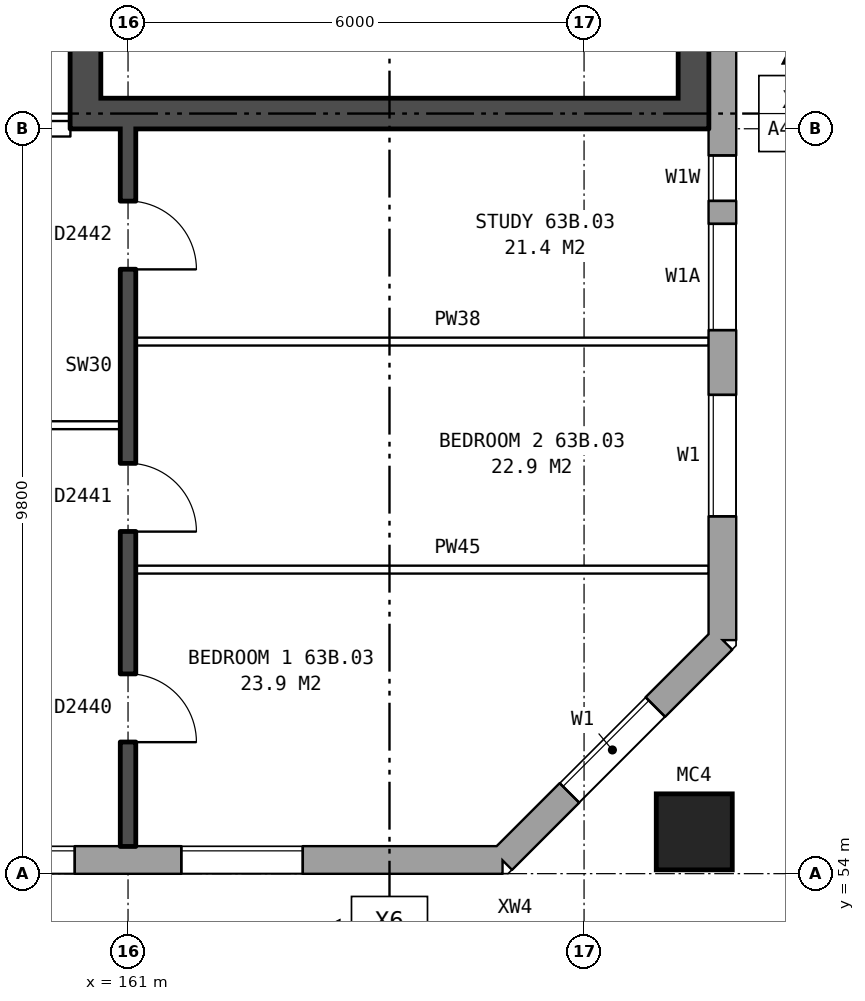
"""IFC4 building model, lengths in metres.
Left out: names, types, materials, properties, quantities, classifications, styles, units other than length and angle.
Written with IfcOpenShell. Run it as: python <this file> out.ifc"""

import sys

from ifc_helpers import new_model, si_unit, direction, frame, frame_2d, origin, origin_2d, place, context, subcontext, project, spatial, rectangle, hollow_rectangle, extrude, element, fill, save


model = new_model("IFC4")
c1 = context("Model", 3, precision=1e-05, world=origin(), true_north=direction((0.0, 1.0)))
c2 = subcontext(c1, "Body", "Model", "MODEL_VIEW")
j1 = project(units=[si_unit("LENGTHUNIT", "METRE"), si_unit("PLANEANGLEUNIT", "RADIAN")], contexts=[c1])
p1 = place(None, origin())
s1 = spatial("IfcSite", under=j1, at=p1, CompositionType="ELEMENT")
p2 = place(p1, origin())
s2 = spatial("IfcBuilding", under=s1, at=p2, CompositionType="ELEMENT")
p3 = place(p2, frame((0.0, 0.0, 224.5)))
s3 = spatial("IfcBuildingStorey", under=s2, at=p3, CompositionType="ELEMENT", Elevation=224.5)
p4 = place(p3, frame((168.45, 54.55, 0.0), z_axis=(0.0, 0.0, 1.0), x_axis=(1.0, 0.0, 0.0)))
e1 = element("IfcColumn", 1, at=p4, inside=s3, PredefinedType="COLUMN", context=c2, shape_type="SweptSolid", body=[
    extrude(hollow_rectangle(XDim=1.0, YDim=1.0, WallThickness=0.055, at=origin_2d()), origin(), (0.0, 0.0, 1.0), 3.1),
])
p5 = place(p3, frame((132.05, 54.18, 0.0), z_axis=(0.0, 0.0, 1.0), x_axis=(1.0, 0.0, 0.0)))
e2 = element("IfcWall", 2, at=p5, inside=s3, PredefinedType="STANDARD", context=c2, shape_type="SweptSolid", body=[
    extrude(rectangle(XDim=33.875, YDim=0.36, at=frame_2d((16.938, 0.0))), origin(), (0.0, 0.0, 1.0), 2.85),
])
p6 = place(p5, frame((2.65, 0.0, 0.8)))
e3 = element("IfcOpeningElement", 3, at=p6, cuts=e2, PredefinedType="OPENING", context=c2, shape_type="SweptSolid", body=[
    extrude(rectangle(XDim=1.6, YDim=1.8, at=frame_2d((0.8, 0.9))), frame((0.0, 0.19, 0.0), z_axis=(0.0, -1.0, 0.0), x_axis=(1.0, 0.0, 0.0)), (0.0, 0.0, 1.0), 0.38),
])
p7 = place(p5, frame((5.65, 0.0, 0.8)))
e4 = element("IfcOpeningElement", 4, at=p7, cuts=e2, PredefinedType="OPENING", context=c2, shape_type="SweptSolid", body=[
    extrude(rectangle(XDim=1.6, YDim=1.8, at=frame_2d((0.8, 0.9))), frame((0.0, 0.19, 0.0), z_axis=(0.0, -1.0, 0.0), x_axis=(1.0, 0.0, 0.0)), (0.0, 0.0, 1.0), 0.38),
])
p8 = place(p5, frame((8.65, 0.0, 0.8)))
e5 = element("IfcOpeningElement", 5, at=p8, cuts=e2, PredefinedType="OPENING", context=c2, shape_type="SweptSolid", body=[
    extrude(rectangle(XDim=1.6, YDim=1.8, at=frame_2d((0.8, 0.9))), frame((0.0, 0.19, 0.0), z_axis=(0.0, -1.0, 0.0), x_axis=(1.0, 0.0, 0.0)), (0.0, 0.0, 1.0), 0.38),
])
p9 = place(p5, frame((11.15, 0.0, 1.7)))
e6 = element("IfcOpeningElement", 6, at=p9, cuts=e2, PredefinedType="OPENING", context=c2, shape_type="SweptSolid", body=[
    extrude(rectangle(XDim=0.6, YDim=0.9, at=frame_2d((0.3, 0.45))), frame((0.0, 0.19, 0.0), z_axis=(0.0, -1.0, 0.0), x_axis=(1.0, 0.0, 0.0)), (0.0, 0.0, 1.0), 0.38),
])
p10 = place(p5, frame((14.65, 0.0, 0.8)))
e7 = element("IfcOpeningElement", 7, at=p10, cuts=e2, PredefinedType="OPENING", context=c2, shape_type="SweptSolid", body=[
    extrude(rectangle(XDim=1.6, YDim=1.8, at=frame_2d((0.8, 0.9))), frame((0.0, 0.19, 0.0), z_axis=(0.0, -1.0, 0.0), x_axis=(1.0, 0.0, 0.0)), (0.0, 0.0, 1.0), 0.38),
])
p11 = place(p5, frame((17.65, 0.0, 0.8)))
e8 = element("IfcOpeningElement", 8, at=p11, cuts=e2, PredefinedType="OPENING", context=c2, shape_type="SweptSolid", body=[
    extrude(rectangle(XDim=1.6, YDim=1.8, at=frame_2d((0.8, 0.9))), frame((0.0, 0.19, 0.0), z_axis=(0.0, -1.0, 0.0), x_axis=(1.0, 0.0, 0.0)), (0.0, 0.0, 1.0), 0.38),
])
p12 = place(p5, frame((20.65, 0.0, 0.8)))
e9 = element("IfcOpeningElement", 9, at=p12, cuts=e2, PredefinedType="OPENING", context=c2, shape_type="SweptSolid", body=[
    extrude(rectangle(XDim=1.6, YDim=1.8, at=frame_2d((0.8, 0.9))), frame((0.0, 0.19, 0.0), z_axis=(0.0, -1.0, 0.0), x_axis=(1.0, 0.0, 0.0)), (0.0, 0.0, 1.0), 0.38),
])
p13 = place(p5, frame((24.65, 0.0, 0.8)))
e10 = element("IfcOpeningElement", 10, at=p13, cuts=e2, PredefinedType="OPENING", context=c2, shape_type="SweptSolid", body=[
    extrude(rectangle(XDim=1.6, YDim=1.8, at=frame_2d((0.8, 0.9))), frame((0.0, 0.19, 0.0), z_axis=(0.0, -1.0, 0.0), x_axis=(1.0, 0.0, 0.0)), (0.0, 0.0, 1.0), 0.38),
])
p14 = place(p5, frame((26.65, 0.0, 0.8)))
e11 = element("IfcOpeningElement", 11, at=p14, cuts=e2, PredefinedType="OPENING", context=c2, shape_type="SweptSolid", body=[
    extrude(rectangle(XDim=1.6, YDim=1.8, at=frame_2d((0.8, 0.9))), frame((0.0, 0.19, 0.0), z_axis=(0.0, -1.0, 0.0), x_axis=(1.0, 0.0, 0.0)), (0.0, 0.0, 1.0), 0.38),
])
p15 = place(p5, frame((29.65, 0.0, 0.8)))
e12 = element("IfcOpeningElement", 12, at=p15, cuts=e2, PredefinedType="OPENING", context=c2, shape_type="SweptSolid", body=[
    extrude(rectangle(XDim=1.6, YDim=1.8, at=frame_2d((0.8, 0.9))), frame((0.0, 0.19, 0.0), z_axis=(0.0, -1.0, 0.0), x_axis=(1.0, 0.0, 0.0)), (0.0, 0.0, 1.0), 0.38),
])
p16 = place(p5, frame((13.2, 0.0, 0.8)))
e13 = element("IfcOpeningElement", 13, at=p16, cuts=e2, PredefinedType="OPENING", context=c2, shape_type="SweptSolid", body=[
    extrude(rectangle(XDim=0.6, YDim=1.5, at=frame_2d((0.3, 0.75))), frame((0.0, 0.19, 0.0), z_axis=(0.0, -1.0, 0.0), x_axis=(1.0, 0.0, 0.0)), (0.0, 0.0, 1.0), 0.38),
])
p17 = place(p3, frame((165.925, 54.18, 0.0), z_axis=(0.0, 0.0, 1.0), x_axis=(0.707106781187, 0.707106781187, 0.0)))
e14 = element("IfcWall", 14, at=p17, inside=s3, PredefinedType="STANDARD", context=c2, shape_type="SweptSolid", body=[
    extrude(rectangle(XDim=4.094, YDim=0.36, at=frame_2d((2.047, 0.0))), origin(), (0.0, 0.0, 1.0), 2.85),
])
p18 = place(p17, frame((1.247, 0.0, 0.8)))
e15 = element("IfcOpeningElement", 15, at=p18, cuts=e14, PredefinedType="OPENING", context=c2, shape_type="SweptSolid", body=[
    extrude(rectangle(XDim=1.6, YDim=1.8, at=frame_2d((0.8, 0.9))), frame((0.0, 0.19, 0.0), z_axis=(0.0, -1.0, 0.0), x_axis=(1.0, 0.0, 0.0)), (0.0, 0.0, 1.0), 0.38),
])
p19 = place(p3, frame((168.82, 57.075, 0.0), z_axis=(0.0, 0.0, 1.0), x_axis=(0.0, 1.0, 0.0)))
e16 = element("IfcWall", 16, at=p19, inside=s3, PredefinedType="STANDARD", context=c2, shape_type="SweptSolid", body=[
    extrude(rectangle(XDim=25.851, YDim=0.36, at=frame_2d((12.925, 0.0))), origin(), (0.0, 0.0, 1.0), 2.85),
])
p20 = place(p19, frame((1.625, 0.0, 0.8)))
e17 = element("IfcOpeningElement", 17, at=p20, cuts=e16, PredefinedType="OPENING", context=c2, shape_type="SweptSolid", body=[
    extrude(rectangle(XDim=1.6, YDim=1.8, at=frame_2d((0.8, 0.9))), frame((0.0, 0.19, 0.0), z_axis=(0.0, -1.0, 0.0), x_axis=(1.0, 0.0, 0.0)), (0.0, 0.0, 1.0), 0.38),
])
p21 = place(p19, frame((4.075, 0.0, 0.8)))
e18 = element("IfcOpeningElement", 18, at=p21, cuts=e16, PredefinedType="OPENING", context=c2, shape_type="SweptSolid", body=[
    extrude(rectangle(XDim=1.4, YDim=1.8, at=frame_2d((0.7, 0.9))), frame((0.0, 0.19, 0.0), z_axis=(0.0, -1.0, 0.0), x_axis=(1.0, 0.0, 0.0)), (0.0, 0.0, 1.0), 0.38),
])
p22 = place(p19, frame((19.425, 0.0, 0.8)))
e19 = element("IfcOpeningElement", 19, at=p22, cuts=e16, PredefinedType="OPENING", context=c2, shape_type="SweptSolid", body=[
    extrude(rectangle(XDim=0.6, YDim=0.9, at=frame_2d((0.3, 0.45))), frame((0.0, 0.19, 0.0), z_axis=(0.0, -1.0, 0.0), x_axis=(1.0, 0.0, 0.0)), (0.0, 0.0, 1.0), 0.38),
])
p23 = place(p19, frame((22.625, 0.0, 0.8)))
e20 = element("IfcOpeningElement", 20, at=p23, cuts=e16, PredefinedType="OPENING", context=c2, shape_type="SweptSolid", body=[
    extrude(rectangle(XDim=1.6, YDim=1.8, at=frame_2d((0.8, 0.9))), frame((0.0, 0.19, 0.0), z_axis=(0.0, -1.0, 0.0), x_axis=(1.0, 0.0, 0.0)), (0.0, 0.0, 1.0), 0.38),
])
p24 = place(p19, frame((5.775, 0.0, 0.8)))
e21 = element("IfcOpeningElement", 21, at=p24, cuts=e16, PredefinedType="OPENING", context=c2, shape_type="SweptSolid", body=[
    extrude(rectangle(XDim=0.6, YDim=0.9, at=frame_2d((0.3, 0.45))), frame((0.0, 0.19, 0.0), z_axis=(0.0, -1.0, 0.0), x_axis=(1.0, 0.0, 0.0)), (0.0, 0.0, 1.0), 0.38),
])
p25 = place(p19, frame((20.325, 0.0, 0.8)))
e22 = element("IfcOpeningElement", 22, at=p25, cuts=e16, PredefinedType="OPENING", context=c2, shape_type="SweptSolid", body=[
    extrude(rectangle(XDim=1.4, YDim=1.8, at=frame_2d((0.7, 0.9))), frame((0.0, 0.19, 0.0), z_axis=(0.0, -1.0, 0.0), x_axis=(1.0, 0.0, 0.0)), (0.0, 0.0, 1.0), 0.38),
])
p26 = place(p3, frame((160.44, 76.2, 0.0), z_axis=(0.0, 0.0, 1.0), x_axis=(0.0, -1.0, 0.0)))
e23 = element("IfcWall", 23, at=p26, inside=s3, PredefinedType="SHEAR", context=c2, shape_type="SweptSolid", body=[
    extrude(rectangle(XDim=12.4, YDim=0.4, at=frame_2d((6.2, 0.0))), origin(), (0.0, 0.0, 1.0), 2.85),
])
p27 = place(p26, frame((1.325, 0.0, 0.0)))
e24 = element("IfcOpeningElement", 24, at=p27, cuts=e23, PredefinedType="OPENING", context=c2, shape_type="SweptSolid", body=[
    extrude(rectangle(XDim=1.1, YDim=2.1, at=frame_2d((0.55, 1.05))), frame((0.0, 0.21, 0.0), z_axis=(0.0, -1.0, 0.0), x_axis=(1.0, 0.0, 0.0)), (0.0, 0.0, 1.0), 0.42),
])
p28 = place(p26, frame((3.625, 0.0, 0.0)))
e25 = element("IfcOpeningElement", 25, at=p28, cuts=e23, PredefinedType="OPENING", context=c2, shape_type="SweptSolid", body=[
    extrude(rectangle(XDim=0.85, YDim=2.1, at=frame_2d((0.425, 1.05))), frame((0.0, 0.21, 0.0), z_axis=(0.0, -1.0, 0.0), x_axis=(1.0, 0.0, 0.0)), (0.0, 0.0, 1.0), 0.42),
])
p29 = place(p26, frame((5.775, 0.0, 0.0)))
e26 = element("IfcOpeningElement", 26, at=p29, cuts=e23, PredefinedType="OPENING", context=c2, shape_type="SweptSolid", body=[
    extrude(rectangle(XDim=0.85, YDim=2.1, at=frame_2d((0.425, 1.05))), frame((0.0, 0.21, 0.0), z_axis=(0.0, -1.0, 0.0), x_axis=(1.0, 0.0, 0.0)), (0.0, 0.0, 1.0), 0.42),
])
p30 = place(p26, frame((9.9, 0.0, 0.0)))
e27 = element("IfcOpeningElement", 27, at=p30, cuts=e23, PredefinedType="OPENING", context=c2, shape_type="SweptSolid", body=[
    extrude(rectangle(XDim=1.1, YDim=2.1, at=frame_2d((0.55, 1.05))), frame((0.0, 0.21, 0.0), z_axis=(0.0, -1.0, 0.0), x_axis=(1.0, 0.0, 0.0)), (0.0, 0.0, 1.0), 0.42),
])
p31 = place(p26, frame((8.125, 0.0, 0.0)))
e28 = element("IfcOpeningElement", 28, at=p31, cuts=e23, PredefinedType="OPENING", context=c2, shape_type="SweptSolid", body=[
    extrude(rectangle(XDim=0.85, YDim=2.1, at=frame_2d((0.425, 1.05))), frame((0.0, 0.21, 0.0), z_axis=(0.0, -1.0, 0.0), x_axis=(1.0, 0.0, 0.0)), (0.0, 0.0, 1.0), 0.42),
])
p32 = place(p3, frame((168.44, 76.2, 0.0), z_axis=(0.0, 0.0, 1.0), x_axis=(0.0, -1.0, 0.0)))
e29 = element("IfcWall", 29, at=p32, inside=s3, PredefinedType="SHEAR", context=c2, shape_type="SweptSolid", body=[
    extrude(rectangle(XDim=12.4, YDim=0.4, at=frame_2d((6.2, 0.0))), origin(), (0.0, 0.0, 1.0), 2.85),
])
p33 = place(p3, frame((160.64, 64.0, 0.0), z_axis=(0.0, 0.0, 1.0), x_axis=(1.0, 0.0, 0.0)))
e30 = element("IfcWall", 30, at=p33, inside=s3, PredefinedType="SHEAR", context=c2, shape_type="SweptSolid", body=[
    extrude(rectangle(XDim=7.6, YDim=0.4, at=frame_2d((3.8, 0.0))), origin(), (0.0, 0.0, 1.0), 2.85),
])
p34 = place(p3, frame((161.1, 58.0, 0.0), z_axis=(0.0, 0.0, 1.0), x_axis=(1.0, 0.0, 0.0)))
e31 = element("IfcWall", 31, at=p34, inside=s3, PredefinedType="PARTITIONING", context=c2, shape_type="SweptSolid", body=[
    extrude(rectangle(XDim=7.54, YDim=0.1, at=frame_2d((3.77, 0.0))), origin(), (0.0, 0.0, 1.0), 2.85),
])
p35 = place(p3, frame((155.1, 59.9, 0.0), z_axis=(0.0, 0.0, 1.0), x_axis=(1.0, 0.0, 0.0)))
e32 = element("IfcWall", 32, at=p35, inside=s3, PredefinedType="PARTITIONING", context=c2, shape_type="SweptSolid", body=[
    extrude(rectangle(XDim=5.8, YDim=0.1, at=frame_2d((2.9, 0.0))), origin(), (0.0, 0.0, 1.0), 2.85),
])
p36 = place(p35, frame((3.6, 0.0, 0.0)))
e33 = element("IfcOpeningElement", 33, at=p36, cuts=e32, PredefinedType="OPENING", context=c2, shape_type="SweptSolid", body=[
    extrude(rectangle(XDim=0.9, YDim=2.1, at=frame_2d((0.45, 1.05))), frame((0.0, 0.06, 0.0), z_axis=(0.0, -1.0, 0.0), x_axis=(1.0, 0.0, 0.0)), (0.0, 0.0, 1.0), 0.12),
])
p37 = place(p35, frame((0.7, 0.0, 0.0)))
e34 = element("IfcOpeningElement", 34, at=p37, cuts=e32, PredefinedType="OPENING", context=c2, shape_type="SweptSolid", body=[
    extrude(rectangle(XDim=0.9, YDim=2.1, at=frame_2d((0.45, 1.05))), frame((0.0, 0.06, 0.0), z_axis=(0.0, -1.0, 0.0), x_axis=(1.0, 0.0, 0.0)), (0.0, 0.0, 1.0), 0.12),
])
p38 = place(p3, frame((161.1, 61.0, 0.0), z_axis=(0.0, 0.0, 1.0), x_axis=(1.0, 0.0, 0.0)))
e35 = element("IfcWall", 35, at=p38, inside=s3, PredefinedType="PARTITIONING", context=c2, shape_type="SweptSolid", body=[
    extrude(rectangle(XDim=7.54, YDim=0.1, at=frame_2d((3.77, 0.0))), origin(), (0.0, 0.0, 1.0), 2.85),
])
p39 = place(p3, frame((157.24, 63.8, 0.0), z_axis=(0.0, 0.0, 1.0), x_axis=(1.0, 0.0, 0.0)))
e36 = element("IfcWall", 36, at=p39, inside=s3, PredefinedType="PARTITIONING", context=c2, shape_type="SweptSolid", body=[
    extrude(rectangle(XDim=3.0, YDim=0.2, at=frame_2d((1.5, 0.0))), origin(), (0.0, 0.0, 1.0), 2.85),
])
p40 = place(p39, frame((1.0, 0.0, 0.0)))
e37 = element("IfcOpeningElement", 37, at=p40, cuts=e36, PredefinedType="OPENING", context=c2, shape_type="SweptSolid", body=[
    extrude(rectangle(XDim=1.0, YDim=2.1, at=frame_2d((0.5, 1.05))), frame((0.0, 0.11, 0.0), z_axis=(0.0, -1.0, 0.0), x_axis=(1.0, 0.0, 0.0)), (0.0, 0.0, 1.0), 0.22),
])
p41 = place(p3, frame((161.0, 54.36, 0.0), z_axis=(0.0, 0.0, 1.0), x_axis=(0.0, 1.0, 0.0)))
e38 = element("IfcWall", 38, at=p41, inside=s3, PredefinedType="SOLIDWALL", context=c2, shape_type="SweptSolid", body=[
    extrude(rectangle(XDim=9.44, YDim=0.2, at=frame_2d((4.72, 0.0))), origin(), (0.0, 0.0, 1.0), 2.85),
])
p42 = place(p41, frame((1.37, 0.0, 0.0)))
e39 = element("IfcOpeningElement", 39, at=p42, cuts=e38, PredefinedType="OPENING", context=c2, shape_type="SweptSolid", body=[
    extrude(rectangle(XDim=0.9, YDim=2.1, at=frame_2d((0.45, 1.05))), frame((0.0, 0.11, 0.0), z_axis=(0.0, -1.0, 0.0), x_axis=(1.0, 0.0, 0.0)), (0.0, 0.0, 1.0), 0.22),
])
p43 = place(p41, frame((4.14, 0.0, 0.0)))
e40 = element("IfcOpeningElement", 40, at=p43, cuts=e38, PredefinedType="OPENING", context=c2, shape_type="SweptSolid", body=[
    extrude(rectangle(XDim=0.9, YDim=2.1, at=frame_2d((0.45, 1.05))), frame((0.0, 0.11, 0.0), z_axis=(0.0, -1.0, 0.0), x_axis=(1.0, 0.0, 0.0)), (0.0, 0.0, 1.0), 0.22),
])
p44 = place(p41, frame((7.59, 0.0, 0.0)))
e41 = element("IfcOpeningElement", 41, at=p44, cuts=e38, PredefinedType="OPENING", context=c2, shape_type="SweptSolid", body=[
    extrude(rectangle(XDim=0.9, YDim=2.1, at=frame_2d((0.45, 1.05))), frame((0.0, 0.11, 0.0), z_axis=(0.0, -1.0, 0.0), x_axis=(1.0, 0.0, 0.0)), (0.0, 0.0, 1.0), 0.22),
])
p45 = place(p14, origin())
e42 = element("IfcWindow", 42, at=p45, inside=s3, PartitioningType="SINGLE_PANEL", PredefinedType="WINDOW", context=c2, shape_type="SweptSolid", body=[
    extrude(rectangle(XDim=1.6, YDim=1.8, at=frame_2d((0.8, 0.9))), frame((0.0, 0.15, 0.0), z_axis=(0.0, -1.0, 0.0), x_axis=(1.0, 0.0, 0.0)), (0.0, 0.0, 1.0), 0.06),
])
fill(e11, e42)
p46 = place(p15, origin())
e43 = element("IfcWindow", 43, at=p46, inside=s3, PartitioningType="SINGLE_PANEL", PredefinedType="WINDOW", context=c2, shape_type="SweptSolid", body=[
    extrude(rectangle(XDim=1.6, YDim=1.8, at=frame_2d((0.8, 0.9))), frame((0.0, 0.15, 0.0), z_axis=(0.0, -1.0, 0.0), x_axis=(1.0, 0.0, 0.0)), (0.0, 0.0, 1.0), 0.06),
])
fill(e12, e43)
p47 = place(p18, origin())
e44 = element("IfcWindow", 44, at=p47, inside=s3, PartitioningType="SINGLE_PANEL", PredefinedType="WINDOW", context=c2, shape_type="SweptSolid", body=[
    extrude(rectangle(XDim=1.6, YDim=1.8, at=frame_2d((0.8, 0.9))), frame((0.0, 0.15, 0.0), z_axis=(0.0, -1.0, 0.0), x_axis=(1.0, 0.0, 0.0)), (0.0, 0.0, 1.0), 0.06),
])
fill(e15, e44)
p48 = place(p20, origin())
e45 = element("IfcWindow", 45, at=p48, inside=s3, PartitioningType="SINGLE_PANEL", PredefinedType="WINDOW", context=c2, shape_type="SweptSolid", body=[
    extrude(rectangle(XDim=1.6, YDim=1.8, at=frame_2d((0.8, 0.9))), frame((0.0, 0.15, 0.0), z_axis=(0.0, -1.0, 0.0), x_axis=(1.0, 0.0, 0.0)), (0.0, 0.0, 1.0), 0.06),
])
fill(e17, e45)
p49 = place(p21, origin())
e46 = element("IfcWindow", 46, at=p49, inside=s3, PartitioningType="SINGLE_PANEL", PredefinedType="WINDOW", context=c2, shape_type="SweptSolid", body=[
    extrude(rectangle(XDim=1.4, YDim=1.8, at=frame_2d((0.7, 0.9))), frame((0.0, 0.15, 0.0), z_axis=(0.0, -1.0, 0.0), x_axis=(1.0, 0.0, 0.0)), (0.0, 0.0, 1.0), 0.06),
])
fill(e18, e46)
p50 = place(p42, frame((0.9, 0.0, 0.0), z_axis=(0.0, 0.0, 1.0), x_axis=(-1.0, 0.0, 0.0)))
e47 = element("IfcDoor", 47, at=p50, inside=s3, OperationType="SINGLE_SWING_RIGHT", PredefinedType="DOOR", context=c2, shape_type="SweptSolid", body=[
    extrude(rectangle(XDim=0.9, YDim=2.1, at=frame_2d((0.45, 1.05))), frame((0.0, 0.025, 0.0), z_axis=(0.0, -1.0, 0.0), x_axis=(1.0, 0.0, 0.0)), (0.0, 0.0, 1.0), 0.05),
])
fill(e39, e47)
p51 = place(p43, frame((0.9, 0.0, 0.0), z_axis=(0.0, 0.0, 1.0), x_axis=(-1.0, 0.0, 0.0)))
e48 = element("IfcDoor", 48, at=p51, inside=s3, OperationType="SINGLE_SWING_RIGHT", PredefinedType="DOOR", context=c2, shape_type="SweptSolid", body=[
    extrude(rectangle(XDim=0.9, YDim=2.1, at=frame_2d((0.45, 1.05))), frame((0.0, 0.025, 0.0), z_axis=(0.0, -1.0, 0.0), x_axis=(1.0, 0.0, 0.0)), (0.0, 0.0, 1.0), 0.05),
])
fill(e40, e48)
p52 = place(p44, frame((0.9, 0.0, 0.0), z_axis=(0.0, 0.0, 1.0), x_axis=(-1.0, 0.0, 0.0)))
e49 = element("IfcDoor", 49, at=p52, inside=s3, OperationType="SINGLE_SWING_RIGHT", PredefinedType="DOOR", context=c2, shape_type="SweptSolid", body=[
    extrude(rectangle(XDim=0.9, YDim=2.1, at=frame_2d((0.45, 1.05))), frame((0.0, 0.025, 0.0), z_axis=(0.0, -1.0, 0.0), x_axis=(1.0, 0.0, 0.0)), (0.0, 0.0, 1.0), 0.05),
])
fill(e41, e49)
p53 = place(p24, origin())
e50 = element("IfcWindow", 50, at=p53, inside=s3, PartitioningType="SINGLE_PANEL", PredefinedType="WINDOW", context=c2, shape_type="SweptSolid", body=[
    extrude(rectangle(XDim=0.6, YDim=0.9, at=frame_2d((0.3, 0.45))), frame((0.0, 0.15, 0.0), z_axis=(0.0, -1.0, 0.0), x_axis=(1.0, 0.0, 0.0)), (0.0, 0.0, 1.0), 0.06),
])
fill(e21, e50)
save(model, sys.argv[1])
